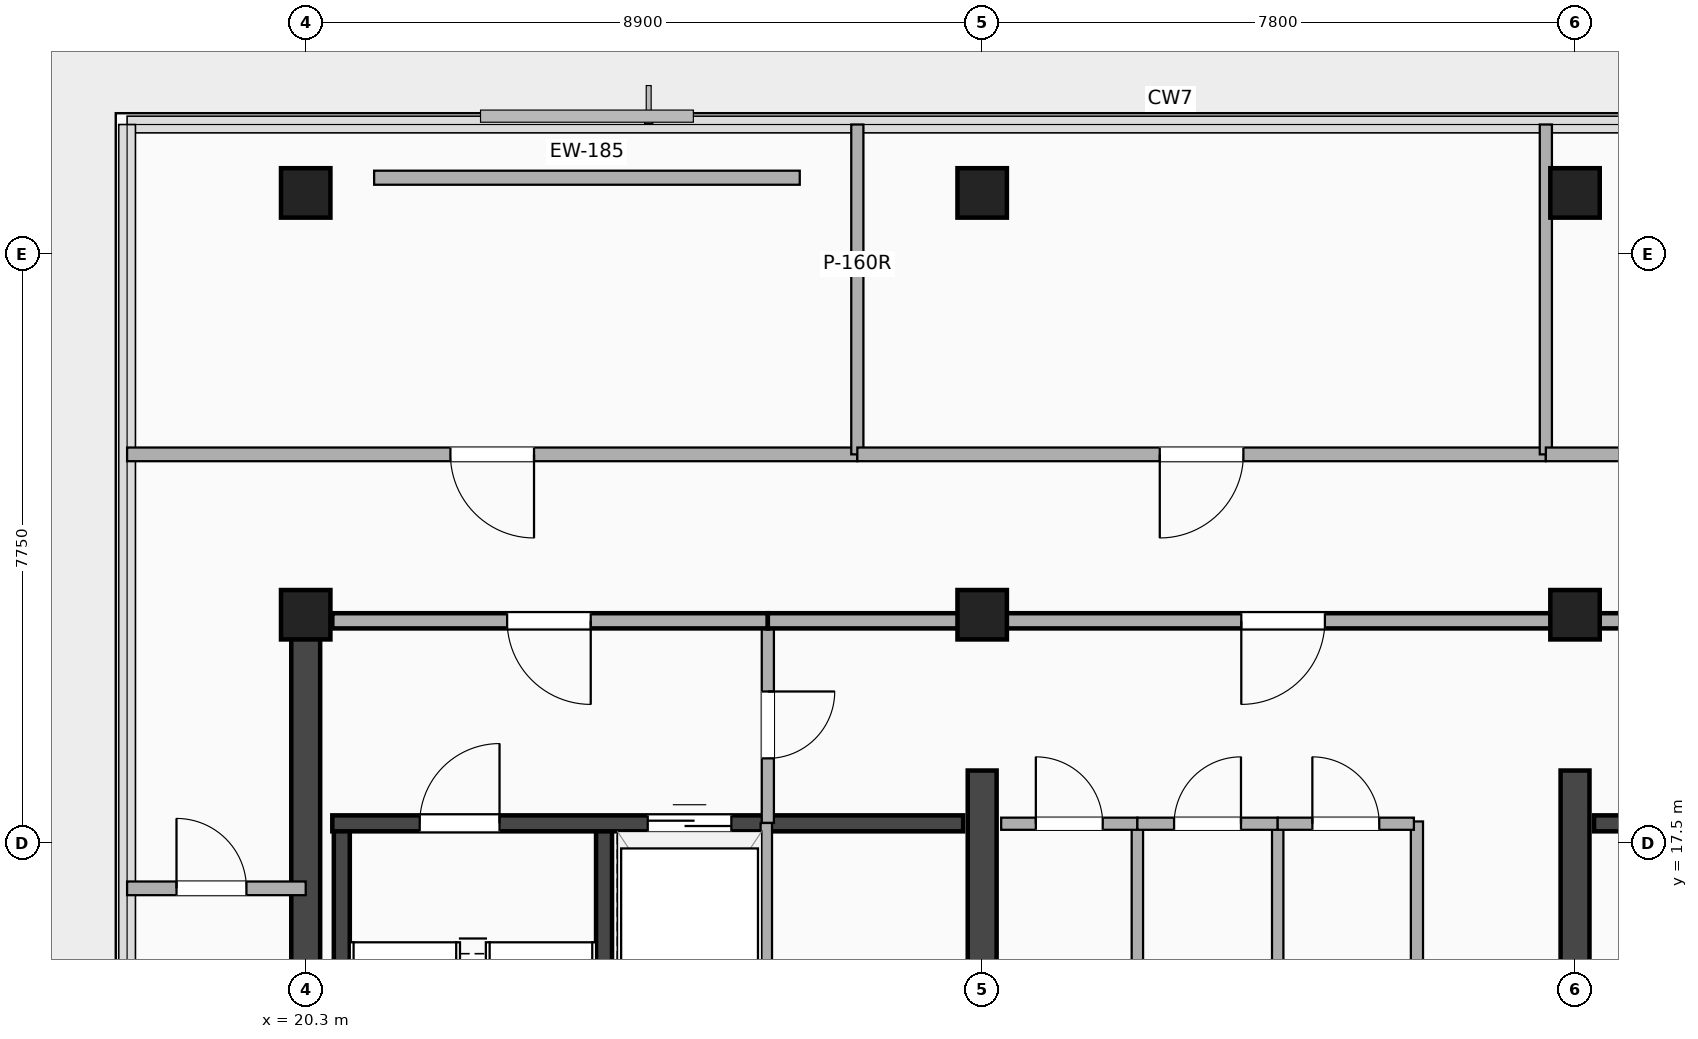
"""IFC4 building model, lengths in metres.
Left out: names, types, materials, properties, quantities, classifications, styles, units other than length and angle.
Written with IfcOpenShell. Run it as: python <this file> out.ifc"""

import sys

from ifc_helpers import new_model, si_unit, direction, frame, frame_2d, origin, origin_2d, place, context, subcontext, project, spatial, rectangle, extrude, element, fill, save


model = new_model("IFC4")
c1 = context("Model", 3, precision=1e-05, world=origin(), true_north=direction((0.0, 1.0)))
c2 = subcontext(c1, "Body", "Model", "MODEL_VIEW")
j1 = project(units=[si_unit("LENGTHUNIT", "METRE"), si_unit("PLANEANGLEUNIT", "RADIAN")], contexts=[c1])
p1 = place(None, origin())
s1 = spatial("IfcSite", under=j1, at=p1, CompositionType="ELEMENT")
p2 = place(p1, origin())
s2 = spatial("IfcBuilding", under=s1, at=p2, CompositionType="ELEMENT")
p3 = place(p2, frame((0.0, 0.0, 303.3)))
s3 = spatial("IfcBuildingStorey", under=s2, at=p3, CompositionType="ELEMENT", Elevation=303.3)
p4 = place(p3, frame((20.3, 3.5, 0.0), z_axis=(0.0, 0.0, 1.0), x_axis=(0.0, 1.0, 0.0)))
e1 = element("IfcWall", 1, at=p4, inside=s3, PredefinedType="SHEAR", context=c2, shape_type="SweptSolid", body=[
    extrude(rectangle(XDim=16.9, YDim=0.38, at=frame_2d((8.45, 0.0))), origin(), (0.0, 0.0, 1.0), 4.3),
])
p5 = place(p3, frame((29.2, 3.5, 0.0), z_axis=(0.0, 0.0, 1.0), x_axis=(0.0, 1.0, 0.0)))
e2 = element("IfcWall", 2, at=p5, inside=s3, PredefinedType="SHEAR", context=c2, shape_type="SweptSolid", body=[
    extrude(rectangle(XDim=14.95, YDim=0.38, at=frame_2d((7.475, 0.0))), origin(), (0.0, 0.0, 1.0), 4.3),
])
p6 = place(p5, frame((7.75, 0.0, 0.0), z_axis=(0.0, 0.0, 1.0), x_axis=(-1.0, 0.0, 0.0)))
e3 = element("IfcOpeningElement", 3, at=p6, cuts=e2, PredefinedType="OPENING", context=c2, shape_type="SweptSolid", body=[
    extrude(rectangle(XDim=1.1, YDim=2.15, at=frame_2d((0.55, 1.075))), frame((0.0, 0.2, 0.0), z_axis=(0.0, -1.0, 0.0), x_axis=(1.0, 0.0, 0.0)), (0.0, 0.0, 1.0), 0.4),
])
p7 = place(p3, frame((37.0, 3.5, 0.0), z_axis=(0.0, 0.0, 1.0), x_axis=(0.0, 1.0, 0.0)))
e4 = element("IfcWall", 4, at=p7, inside=s3, PredefinedType="SHEAR", context=c2, shape_type="SweptSolid", body=[
    extrude(rectangle(XDim=14.95, YDim=0.38, at=frame_2d((7.475, 0.0))), origin(), (0.0, 0.0, 1.0), 4.3),
])
p8 = place(p7, frame((6.65, 0.0, 0.0)))
e5 = element("IfcOpeningElement", 5, at=p8, cuts=e4, PredefinedType="OPENING", context=c2, shape_type="SweptSolid", body=[
    extrude(rectangle(XDim=1.1, YDim=2.15, at=frame_2d((0.55, 1.075))), frame((0.0, 0.2, 0.0), z_axis=(0.0, -1.0, 0.0), x_axis=(1.0, 0.0, 0.0)), (0.0, 0.0, 1.0), 0.4),
])
for number, where, z_axis, x_axis in (
    (6, (20.775, 9.745, 0.0), (0.0, 0.0, 1.0), (0.0, 1.0, 0.0)),
    (7, (24.225, 9.745, 0.0), (0.0, 0.0, 1.0), (0.0, 1.0, 0.0)),
):
    element("IfcWall", number, at=place(p3, frame(where, z_axis=z_axis, x_axis=x_axis)), inside=s3, PredefinedType="SHEAR", context=c2, shape_type="SweptSolid", body=[
        extrude(rectangle(XDim=8.01, YDim=0.21, at=frame_2d((4.005, 0.0))), origin(), (0.0, 0.0, 1.0), 4.3),
    ])
p9 = place(p3, frame((20.65, 17.755, 0.0), z_axis=(0.0, 0.0, 1.0), x_axis=(1.0, 0.0, 0.0)))
e8 = element("IfcWall", 8, at=p9, inside=s3, PredefinedType="SHEAR", context=c2, shape_type="SweptSolid", body=[
    extrude(rectangle(XDim=8.3, YDim=0.21, at=frame_2d((4.15, 0.0))), origin(), (0.0, 0.0, 1.0), 4.3),
])
p10 = place(p9, frame((2.2, 0.0, 0.0), z_axis=(0.0, 0.0, 1.0), x_axis=(-1.0, 0.0, 0.0)))
e9 = element("IfcOpeningElement", 9, at=p10, cuts=e8, PredefinedType="OPENING", context=c2, shape_type="SweptSolid", body=[
    extrude(rectangle(XDim=1.05, YDim=2.15, at=frame_2d((0.525, 1.075))), frame((0.0, 0.115, 0.0), z_axis=(0.0, -1.0, 0.0), x_axis=(1.0, 0.0, 0.0)), (0.0, 0.0, 1.0), 0.23),
])
p11 = place(p9, frame((4.15, 0.0, 0.0)))
e10 = element("IfcOpeningElement", 10, at=p11, cuts=e8, PredefinedType="OPENING", context=c2, shape_type="SweptSolid", body=[
    extrude(rectangle(XDim=1.1, YDim=2.18, at=frame_2d((0.55, 1.09))), frame((0.0, 0.115, 0.0), z_axis=(0.0, -1.0, 0.0), x_axis=(1.0, 0.0, 0.0)), (0.0, 0.0, 1.0), 0.23),
])
p12 = place(p3, frame((37.25, 17.755, 0.0), z_axis=(0.0, 0.0, 1.0), x_axis=(1.0, 0.0, 0.0)))
e11 = element("IfcWall", 11, at=p12, inside=s3, PredefinedType="SHEAR", context=c2, shape_type="SweptSolid", body=[
    extrude(rectangle(XDim=7.2, YDim=0.21, at=frame_2d((3.6, 0.0))), origin(), (0.0, 0.0, 1.0), 4.3),
])
p13 = place(p12, frame((2.05, 0.0, 0.0)))
e12 = element("IfcOpeningElement", 12, at=p13, cuts=e11, PredefinedType="OPENING", context=c2, shape_type="SweptSolid", body=[
    extrude(rectangle(XDim=1.1, YDim=2.18, at=frame_2d((0.55, 1.09))), frame((0.0, 0.115, 0.0), z_axis=(0.0, -1.0, 0.0), x_axis=(1.0, 0.0, 0.0)), (0.0, 0.0, 1.0), 0.23),
])
p14 = place(p12, frame((5.78, 0.0, 0.0), z_axis=(0.0, 0.0, 1.0), x_axis=(-1.0, 0.0, 0.0)))
e13 = element("IfcOpeningElement", 13, at=p14, cuts=e11, PredefinedType="OPENING", context=c2, shape_type="SweptSolid", body=[
    extrude(rectangle(XDim=1.05, YDim=2.15, at=frame_2d((0.525, 1.075))), frame((0.0, 0.115, 0.0), z_axis=(0.0, -1.0, 0.0), x_axis=(1.0, 0.0, 0.0)), (0.0, 0.0, 1.0), 0.23),
])
for number, where, z_axis, x_axis in (
    (14, (20.3, 20.5, -0.3), (0.0, 0.0, 1.0), (1.0, 0.0, 0.0)),
    (15, (29.2, 20.5, -0.3), (0.0, 0.0, 1.0), (1.0, 0.0, 0.0)),
    (16, (37.0, 20.5, -0.3), (0.0, 0.0, 1.0), (1.0, 0.0, 0.0)),
    (17, (20.3, 26.05, -0.3), (0.0, 0.0, 1.0), (1.0, 0.0, 0.0)),
    (18, (29.2, 26.05, -0.3), (0.0, 0.0, 1.0), (1.0, 0.0, 0.0)),
    (19, (37.0, 26.05, -0.3), (0.0, 0.0, 1.0), (1.0, 0.0, 0.0)),
):
    element("IfcColumn", number, at=place(p3, frame(where, z_axis=z_axis, x_axis=x_axis)), inside=s3, PredefinedType="COLUMN", context=c2, shape_type="SweptSolid", body=[
        extrude(rectangle(XDim=0.65, YDim=0.65, at=origin_2d()), origin(), (0.0, 0.0, 1.0), 4.6),
    ])
p15 = place(p3, frame((21.2, 26.25, 0.0), z_axis=(0.0, 0.0, 1.0), x_axis=(1.0, 0.0, 0.0)))
e20 = element("IfcWall", 20, at=p15, inside=s3, PredefinedType="ELEMENTEDWALL", context=c2, shape_type="SweptSolid", body=[
    extrude(rectangle(XDim=5.6, YDim=0.185, at=frame_2d((2.8, 0.0))), origin(), (0.0, 0.0, 1.0), 2.605),
])
p16 = place(p3, frame((26.38, 17.76, 0.0), z_axis=(0.0, 0.0, 1.0), x_axis=(0.0, 1.0, 0.0)))
e21 = element("IfcWall", 21, at=p16, inside=s3, PredefinedType="PARTITIONING", context=c2, shape_type="SweptSolid", body=[
    extrude(rectangle(XDim=2.66, YDim=0.16, at=frame_2d((1.33, 0.0))), origin(), (0.0, 0.0, 1.0), 3.512),
])
p17 = place(p16, frame((0.85, 0.0, 0.0)))
e22 = element("IfcOpeningElement", 22, at=p17, cuts=e21, PredefinedType="OPENING", context=c2, shape_type="SweptSolid", body=[
    extrude(rectangle(XDim=0.88, YDim=2.08, at=frame_2d((0.44, 1.04))), frame((0.0, 0.09, 0.0), z_axis=(0.0, -1.0, 0.0), x_axis=(1.0, 0.0, 0.0)), (0.0, 0.0, 1.0), 0.18),
])
p18 = place(p3, frame((26.36, 14.72, 0.0), z_axis=(0.0, 0.0, 1.0), x_axis=(0.0, 1.0, 0.0)))
e23 = element("IfcWall", 23, at=p18, inside=s3, PredefinedType="PARTITIONING", context=c2, shape_type="SweptSolid", body=[
    extrude(rectangle(XDim=3.04, YDim=0.15, at=frame_2d((1.52, 0.0))), origin(), (0.0, 0.0, 1.0), 4.3),
])
p19 = place(p3, frame((20.65, 20.42, 0.0), z_axis=(0.0, 0.0, 1.0), x_axis=(1.0, 0.0, 0.0)))
e24 = element("IfcWall", 24, at=p19, inside=s3, PredefinedType="PARTITIONING", context=c2, shape_type="SweptSolid", body=[
    extrude(rectangle(XDim=5.73, YDim=0.2, at=frame_2d((2.865, 0.0))), origin(), (0.0, 0.0, 1.0), 2.605),
])
p20 = place(p19, frame((2.3, 0.0, 0.0)))
e25 = element("IfcOpeningElement", 25, at=p20, cuts=e24, PredefinedType="OPENING", context=c2, shape_type="SweptSolid", body=[
    extrude(rectangle(XDim=1.1, YDim=2.15, at=frame_2d((0.55, 1.075))), frame((0.0, 0.11, 0.0), z_axis=(0.0, -1.0, 0.0), x_axis=(1.0, 0.0, 0.0)), (0.0, 0.0, 1.0), 0.22),
])
p21 = place(p3, frame((26.38, 20.42, 0.0), z_axis=(0.0, 0.0, 1.0), x_axis=(1.0, 0.0, 0.0)))
e26 = element("IfcWall", 26, at=p21, inside=s3, PredefinedType="PARTITIONING", context=c2, shape_type="SweptSolid", body=[
    extrude(rectangle(XDim=2.82, YDim=0.2, at=frame_2d((1.41, 0.0))), origin(), (0.0, 0.0, 1.0), 2.605),
])
p22 = place(p3, frame((29.2, 20.42, 0.0), z_axis=(0.0, 0.0, 1.0), x_axis=(1.0, 0.0, 0.0)))
e27 = element("IfcWall", 27, at=p22, inside=s3, PredefinedType="PARTITIONING", context=c2, shape_type="SweptSolid", body=[
    extrude(rectangle(XDim=7.8, YDim=0.2, at=frame_2d((3.9, 0.0))), origin(), (0.0, 0.0, 1.0), 2.605),
])
p23 = place(p22, frame((3.409, 0.0, 0.0)))
e28 = element("IfcOpeningElement", 28, at=p23, cuts=e27, PredefinedType="OPENING", context=c2, shape_type="SweptSolid", body=[
    extrude(rectangle(XDim=1.1, YDim=2.15, at=frame_2d((0.55, 1.075))), frame((0.0, 0.11, 0.0), z_axis=(0.0, -1.0, 0.0), x_axis=(1.0, 0.0, 0.0)), (0.0, 0.0, 1.0), 0.22),
])
p24 = place(p3, frame((37.0, 20.42, 0.0), z_axis=(0.0, 0.0, 1.0), x_axis=(1.0, 0.0, 0.0)))
e29 = element("IfcWall", 29, at=p24, inside=s3, PredefinedType="PARTITIONING", context=c2, shape_type="SweptSolid", body=[
    extrude(rectangle(XDim=7.45, YDim=0.2, at=frame_2d((3.725, 0.0))), origin(), (0.0, 0.0, 1.0), 2.605),
])
p25 = place(p24, frame((4.2, 0.0, 0.0)))
e30 = element("IfcOpeningElement", 30, at=p25, cuts=e29, PredefinedType="OPENING", context=c2, shape_type="SweptSolid", body=[
    extrude(rectangle(XDim=1.1, YDim=2.15, at=frame_2d((0.55, 1.075))), frame((0.0, 0.11, 0.0), z_axis=(0.0, -1.0, 0.0), x_axis=(1.0, 0.0, 0.0)), (0.0, 0.0, 1.0), 0.22),
])
p26 = place(p3, frame((34.92, 11.68, 0.0), z_axis=(0.0, 0.0, 1.0), x_axis=(0.0, 1.0, 0.0)))
e31 = element("IfcWall", 31, at=p26, inside=s3, PredefinedType="PARTITIONING", context=c2, shape_type="SweptSolid", body=[
    extrude(rectangle(XDim=6.1, YDim=0.16, at=frame_2d((3.05, 0.0))), origin(), (0.0, 0.0, 1.0), 4.3),
])
p27 = place(p3, frame((31.242, 11.74, 0.0), z_axis=(0.0, 0.0, 1.0), x_axis=(0.0, 1.0, 0.0)))
e32 = element("IfcWall", 32, at=p27, inside=s3, PredefinedType="PARTITIONING", context=c2, shape_type="SweptSolid", body=[
    extrude(rectangle(XDim=6.01, YDim=0.15, at=frame_2d((3.005, 0.0))), origin(), (0.0, 0.0, 1.0), 4.3),
])
p28 = place(p3, frame((29.45, 17.75, 0.0), z_axis=(0.0, 0.0, 1.0), x_axis=(1.0, 0.0, 0.0)))
e33 = element("IfcWall", 33, at=p28, inside=s3, PredefinedType="PARTITIONING", context=c2, shape_type="SweptSolid", body=[
    extrude(rectangle(XDim=1.792, YDim=0.16, at=frame_2d((0.896, 0.0))), origin(), (0.0, 0.0, 1.0), 4.3),
])
p29 = place(p28, frame((1.336, 0.0, 0.0), z_axis=(0.0, 0.0, 1.0), x_axis=(-1.0, 0.0, 0.0)))
e34 = element("IfcOpeningElement", 34, at=p29, cuts=e33, PredefinedType="OPENING", context=c2, shape_type="SweptSolid", body=[
    extrude(rectangle(XDim=0.88, YDim=2.08, at=frame_2d((0.44, 1.04))), frame((0.0, 0.09, 0.0), z_axis=(0.0, -1.0, 0.0), x_axis=(1.0, 0.0, 0.0)), (0.0, 0.0, 1.0), 0.18),
])
p30 = place(p3, frame((33.088, 11.74, 0.0), z_axis=(0.0, 0.0, 1.0), x_axis=(0.0, 1.0, 0.0)))
e35 = element("IfcWall", 35, at=p30, inside=s3, PredefinedType="PARTITIONING", context=c2, shape_type="SweptSolid", body=[
    extrude(rectangle(XDim=6.01, YDim=0.15, at=frame_2d((3.005, 0.0))), origin(), (0.0, 0.0, 1.0), 4.3),
])
p31 = place(p3, frame((31.242, 17.75, 0.0), z_axis=(0.0, 0.0, 1.0), x_axis=(1.0, 0.0, 0.0)))
e36 = element("IfcWall", 36, at=p31, inside=s3, PredefinedType="PARTITIONING", context=c2, shape_type="SweptSolid", body=[
    extrude(rectangle(XDim=1.846, YDim=0.16, at=frame_2d((0.923, 0.0))), origin(), (0.0, 0.0, 1.0), 4.3),
])
p32 = place(p31, frame((1.363, 0.0, 0.0), z_axis=(0.0, 0.0, 1.0), x_axis=(-1.0, 0.0, 0.0)))
e37 = element("IfcOpeningElement", 37, at=p32, cuts=e36, PredefinedType="OPENING", context=c2, shape_type="SweptSolid", body=[
    extrude(rectangle(XDim=0.88, YDim=2.08, at=frame_2d((0.44, 1.04))), frame((0.0, 0.09, 0.0), z_axis=(0.0, -1.0, 0.0), x_axis=(1.0, 0.0, 0.0)), (0.0, 0.0, 1.0), 0.18),
])
p33 = place(p3, frame((33.088, 17.75, 0.0), z_axis=(0.0, 0.0, 1.0), x_axis=(1.0, 0.0, 0.0)))
e38 = element("IfcWall", 38, at=p33, inside=s3, PredefinedType="PARTITIONING", context=c2, shape_type="SweptSolid", body=[
    extrude(rectangle(XDim=1.792, YDim=0.16, at=frame_2d((0.896, 0.0))), origin(), (0.0, 0.0, 1.0), 4.3),
])
p34 = place(p33, frame((1.336, 0.0, 0.0), z_axis=(0.0, 0.0, 1.0), x_axis=(-1.0, 0.0, 0.0)))
e39 = element("IfcOpeningElement", 39, at=p34, cuts=e38, PredefinedType="OPENING", context=c2, shape_type="SweptSolid", body=[
    extrude(rectangle(XDim=0.88, YDim=2.08, at=frame_2d((0.44, 1.04))), frame((0.0, 0.09, 0.0), z_axis=(0.0, -1.0, 0.0), x_axis=(1.0, 0.0, 0.0)), (0.0, 0.0, 1.0), 0.18),
])
p35 = place(p3, frame((17.95, 22.61, 0.0), z_axis=(0.0, 0.0, 1.0), x_axis=(1.0, 0.0, 0.0)))
e40 = element("IfcWall", 40, at=p35, inside=s3, PredefinedType="PARTITIONING", context=c2, shape_type="SweptSolid", body=[
    extrude(rectangle(XDim=9.608, YDim=0.18, at=frame_2d((4.804, 0.0))), origin(), (0.0, 0.0, 1.0), 2.605),
])
p36 = place(p35, frame((4.254, 0.0, 0.0)))
e41 = element("IfcOpeningElement", 41, at=p36, cuts=e40, PredefinedType="OPENING", context=c2, shape_type="SweptSolid", body=[
    extrude(rectangle(XDim=1.1, YDim=2.15, at=frame_2d((0.55, 1.075))), frame((0.0, 0.1, 0.0), z_axis=(0.0, -1.0, 0.0), x_axis=(1.0, 0.0, 0.0)), (0.0, 0.0, 1.0), 0.2),
])
p37 = place(p3, frame((27.558, 22.61, 0.0), z_axis=(0.0, 0.0, 1.0), x_axis=(0.0, 1.0, 0.0)))
e42 = element("IfcWall", 42, at=p37, inside=s3, PredefinedType="PARTITIONING", context=c2, shape_type="SweptSolid", body=[
    extrude(rectangle(XDim=4.34, YDim=0.16, at=frame_2d((2.17, 0.0))), origin(), (0.0, 0.0, 1.0), 3.885),
])
p38 = place(p3, frame((27.558, 22.61, 0.0), z_axis=(0.0, 0.0, 1.0), x_axis=(1.0, 0.0, 0.0)))
e43 = element("IfcWall", 43, at=p38, inside=s3, PredefinedType="PARTITIONING", context=c2, shape_type="SweptSolid", body=[
    extrude(rectangle(XDim=9.058, YDim=0.18, at=frame_2d((4.529, 0.0))), origin(), (0.0, 0.0, 1.0), 2.605),
])
p39 = place(p38, frame((3.979, 0.0, 0.0)))
e44 = element("IfcOpeningElement", 44, at=p39, cuts=e43, PredefinedType="OPENING", context=c2, shape_type="SweptSolid", body=[
    extrude(rectangle(XDim=1.1, YDim=2.15, at=frame_2d((0.55, 1.075))), frame((0.0, 0.1, 0.0), z_axis=(0.0, -1.0, 0.0), x_axis=(1.0, 0.0, 0.0)), (0.0, 0.0, 1.0), 0.2),
])
p40 = place(p3, frame((36.616, 22.61, 0.0), z_axis=(0.0, 0.0, 1.0), x_axis=(0.0, 1.0, 0.0)))
e45 = element("IfcWall", 45, at=p40, inside=s3, PredefinedType="PARTITIONING", context=c2, shape_type="SweptSolid", body=[
    extrude(rectangle(XDim=4.34, YDim=0.16, at=frame_2d((2.17, 0.0))), origin(), (0.0, 0.0, 1.0), 2.605),
])
p41 = place(p3, frame((36.616, 22.61, 0.0), z_axis=(0.0, 0.0, 1.0), x_axis=(1.0, 0.0, 0.0)))
e46 = element("IfcWall", 46, at=p41, inside=s3, PredefinedType="PARTITIONING", context=c2, shape_type="SweptSolid", body=[
    extrude(rectangle(XDim=8.784, YDim=0.18, at=frame_2d((4.392, 0.0))), origin(), (0.0, 0.0, 1.0), 2.605),
])
p42 = place(p41, frame((3.842, 0.0, 0.0)))
e47 = element("IfcOpeningElement", 47, at=p42, cuts=e46, PredefinedType="OPENING", context=c2, shape_type="SweptSolid", body=[
    extrude(rectangle(XDim=1.1, YDim=2.15, at=frame_2d((0.55, 1.075))), frame((0.0, 0.1, 0.0), z_axis=(0.0, -1.0, 0.0), x_axis=(1.0, 0.0, 0.0)), (0.0, 0.0, 1.0), 0.2),
])
p43 = place(p3, frame((17.95, 16.9, 0.0), z_axis=(0.0, 0.0, 1.0), x_axis=(1.0, 0.0, 0.0)))
e48 = element("IfcWall", 48, at=p43, inside=s3, PredefinedType="PARTITIONING", context=c2, shape_type="SweptSolid", body=[
    extrude(rectangle(XDim=2.35, YDim=0.18, at=frame_2d((1.175, 0.0))), origin(), (0.0, 0.0, 1.0), 3.885),
])
p44 = place(p43, frame((1.57, 0.0, 0.0), z_axis=(0.0, 0.0, 1.0), x_axis=(-1.0, 0.0, 0.0)))
e49 = element("IfcOpeningElement", 49, at=p44, cuts=e48, PredefinedType="OPENING", context=c2, shape_type="SweptSolid", body=[
    extrude(rectangle(XDim=0.92, YDim=2.08, at=frame_2d((0.46, 1.04))), frame((0.0, 0.1, 0.0), z_axis=(0.0, -1.0, 0.0), x_axis=(1.0, 0.0, 0.0)), (0.0, 0.0, 1.0), 0.2),
])
p45 = place(p10, origin())
e50 = element("IfcDoor", 50, at=p45, inside=s3, OperationType="SINGLE_SWING_RIGHT", PredefinedType="DOOR", context=c2, shape_type="SweptSolid", body=[
    extrude(rectangle(XDim=1.05, YDim=2.15, at=frame_2d((0.525, 1.075))), frame((0.0, 0.025, 0.0), z_axis=(0.0, -1.0, 0.0), x_axis=(1.0, 0.0, 0.0)), (0.0, 0.0, 1.0), 0.05),
])
fill(e9, e50)
p46 = place(p11, origin())
e51 = element("IfcDoor", 51, at=p46, inside=s3, OperationType="DOUBLE_DOOR_SLIDING", PredefinedType="DOOR", context=c2, shape_type="SweptSolid", body=[
    extrude(rectangle(XDim=1.1, YDim=2.18, at=frame_2d((0.55, 1.09))), frame((0.0, 0.025, 0.0), z_axis=(0.0, -1.0, 0.0), x_axis=(1.0, 0.0, 0.0)), (0.0, 0.0, 1.0), 0.05),
])
fill(e10, e51)
p47 = place(p17, origin())
e52 = element("IfcDoor", 52, at=p47, inside=s3, OperationType="SINGLE_SWING_RIGHT", PredefinedType="DOOR", context=c2, shape_type="SweptSolid", body=[
    extrude(rectangle(XDim=0.88, YDim=2.08, at=frame_2d((0.44, 1.04))), frame((0.0, 0.025, 0.0), z_axis=(0.0, -1.0, 0.0), x_axis=(1.0, 0.0, 0.0)), (0.0, 0.0, 1.0), 0.05),
])
fill(e22, e52)
p48 = place(p20, origin())
e53 = element("IfcDoor", 53, at=p48, inside=s3, OperationType="SINGLE_SWING_RIGHT", PredefinedType="DOOR", context=c2, shape_type="SweptSolid", body=[
    extrude(rectangle(XDim=1.1, YDim=2.15, at=frame_2d((0.55, 1.075))), frame((0.0, 0.025, 0.0), z_axis=(0.0, -1.0, 0.0), x_axis=(1.0, 0.0, 0.0)), (0.0, 0.0, 1.0), 0.05),
])
fill(e25, e53)
p49 = place(p23, origin())
e54 = element("IfcDoor", 54, at=p49, inside=s3, OperationType="SINGLE_SWING_LEFT", PredefinedType="DOOR", context=c2, shape_type="SweptSolid", body=[
    extrude(rectangle(XDim=1.1, YDim=2.15, at=frame_2d((0.55, 1.075))), frame((0.0, 0.025, 0.0), z_axis=(0.0, -1.0, 0.0), x_axis=(1.0, 0.0, 0.0)), (0.0, 0.0, 1.0), 0.05),
])
fill(e28, e54)
p50 = place(p29, origin())
e55 = element("IfcDoor", 55, at=p50, inside=s3, OperationType="SINGLE_SWING_LEFT", PredefinedType="DOOR", context=c2, shape_type="SweptSolid", body=[
    extrude(rectangle(XDim=0.88, YDim=2.08, at=frame_2d((0.44, 1.04))), frame((0.0, 0.025, 0.0), z_axis=(0.0, -1.0, 0.0), x_axis=(1.0, 0.0, 0.0)), (0.0, 0.0, 1.0), 0.05),
])
fill(e34, e55)
p51 = place(p32, origin())
e56 = element("IfcDoor", 56, at=p51, inside=s3, OperationType="SINGLE_SWING_RIGHT", PredefinedType="DOOR", context=c2, shape_type="SweptSolid", body=[
    extrude(rectangle(XDim=0.88, YDim=2.08, at=frame_2d((0.44, 1.04))), frame((0.0, 0.025, 0.0), z_axis=(0.0, -1.0, 0.0), x_axis=(1.0, 0.0, 0.0)), (0.0, 0.0, 1.0), 0.05),
])
fill(e37, e56)
p52 = place(p34, origin())
e57 = element("IfcDoor", 57, at=p52, inside=s3, OperationType="SINGLE_SWING_LEFT", PredefinedType="DOOR", context=c2, shape_type="SweptSolid", body=[
    extrude(rectangle(XDim=0.88, YDim=2.08, at=frame_2d((0.44, 1.04))), frame((0.0, 0.025, 0.0), z_axis=(0.0, -1.0, 0.0), x_axis=(1.0, 0.0, 0.0)), (0.0, 0.0, 1.0), 0.05),
])
fill(e39, e57)
p53 = place(p36, origin())
e58 = element("IfcDoor", 58, at=p53, inside=s3, OperationType="SINGLE_SWING_RIGHT", PredefinedType="DOOR", context=c2, shape_type="SweptSolid", body=[
    extrude(rectangle(XDim=1.1, YDim=2.15, at=frame_2d((0.55, 1.075))), frame((0.0, 0.025, 0.0), z_axis=(0.0, -1.0, 0.0), x_axis=(1.0, 0.0, 0.0)), (0.0, 0.0, 1.0), 0.05),
])
fill(e41, e58)
p54 = place(p39, origin())
e59 = element("IfcDoor", 59, at=p54, inside=s3, OperationType="SINGLE_SWING_LEFT", PredefinedType="DOOR", context=c2, shape_type="SweptSolid", body=[
    extrude(rectangle(XDim=1.1, YDim=2.15, at=frame_2d((0.55, 1.075))), frame((0.0, 0.025, 0.0), z_axis=(0.0, -1.0, 0.0), x_axis=(1.0, 0.0, 0.0)), (0.0, 0.0, 1.0), 0.05),
])
fill(e44, e59)
p55 = place(p44, origin())
e60 = element("IfcDoor", 60, at=p55, inside=s3, OperationType="SINGLE_SWING_LEFT", PredefinedType="DOOR", context=c2, shape_type="SweptSolid", body=[
    extrude(rectangle(XDim=0.92, YDim=2.08, at=frame_2d((0.46, 1.04))), frame((0.0, 0.025, 0.0), z_axis=(0.0, -1.0, 0.0), x_axis=(1.0, 0.0, 0.0)), (0.0, 0.0, 1.0), 0.05),
])
fill(e49, e60)
save(model, sys.argv[1])
